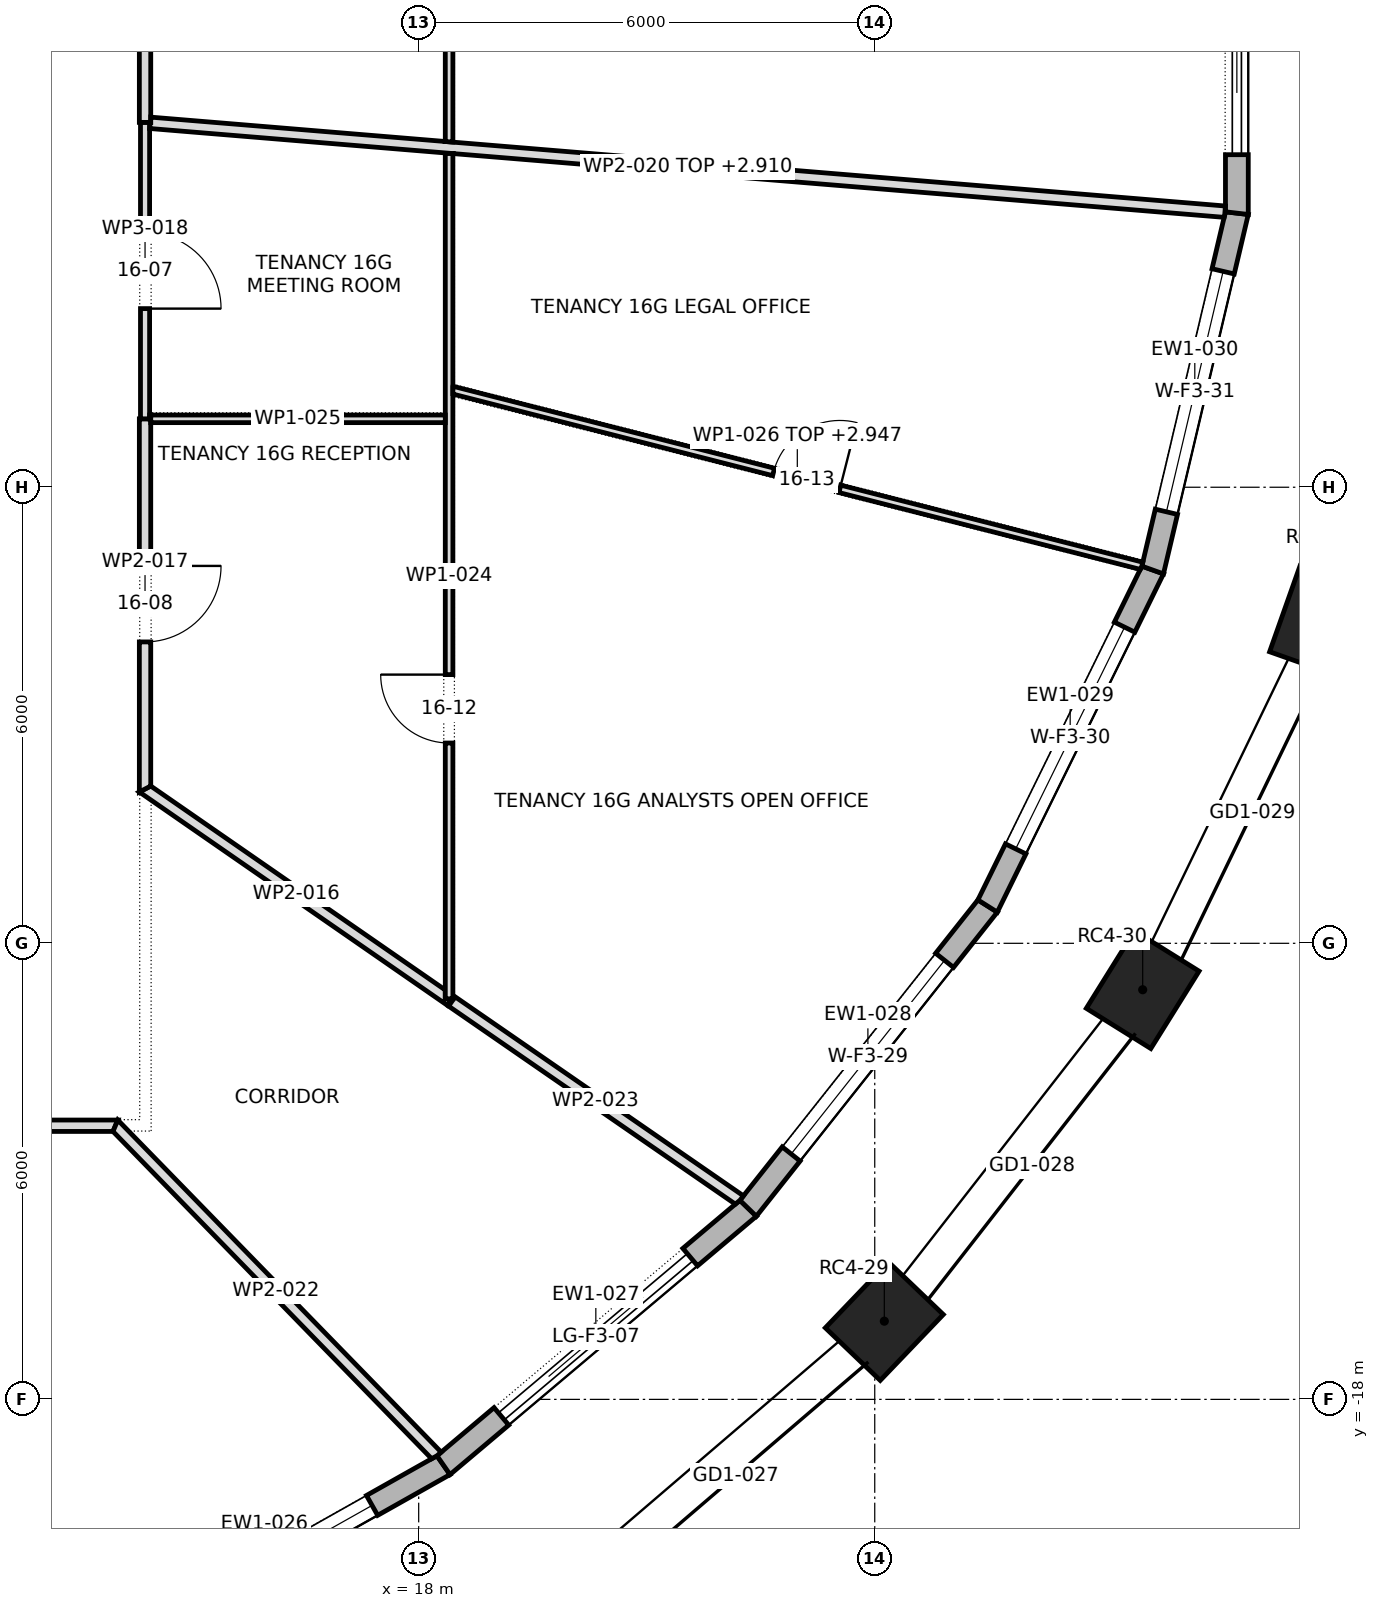
"""IFC4 building model, lengths in metres.
Left out: names, types, materials, properties, quantities, classifications, styles, units other than length and angle.
Written with IfcOpenShell. Run it as: python <this file> out.ifc"""

import sys

from ifc_helpers import new_model, si_unit, direction, frame, frame_2d, origin, origin_2d, place, context, subcontext, project, spatial, polyline, rectangle, outline, extrude, element, fill, save


model = new_model("IFC4")
c1 = context("Model", 3, precision=1e-05, world=origin(), true_north=direction((0.0, 1.0)))
c2 = subcontext(c1, "Body", "Model", "MODEL_VIEW")
j1 = project(units=[si_unit("LENGTHUNIT", "METRE"), si_unit("PLANEANGLEUNIT", "RADIAN")], contexts=[c1])
p1 = place(None, origin())
s1 = spatial("IfcSite", under=j1, at=p1, CompositionType="ELEMENT")
p2 = place(p1, origin())
s2 = spatial("IfcBuilding", under=s1, at=p2, CompositionType="ELEMENT")
p3 = place(p2, frame((0.0, 0.0, 234.9)))
s3 = spatial("IfcBuildingStorey", under=s2, at=p3, CompositionType="ELEMENT", Elevation=234.9)
for number, where, z_axis, x_axis in (
    (1, (24.126, -16.971, 0.0), (0.0, 0.0, 1.0), (0.692, 0.722, 0.0)),
    (2, (27.525, -12.611, 0.0), (0.0, 0.0, 1.0), (0.529, 0.849, 0.0)),
    (3, (29.867, -7.766, 0.0), (0.0, 0.0, 1.0), (0.334, 0.943, 0.0)),
):
    element("IfcColumn", number, at=place(p3, frame(where, z_axis=z_axis, x_axis=x_axis)), inside=s3, PredefinedType="COLUMN", context=c2, shape_type="SweptSolid", body=[
        extrude(rectangle(XDim=1.2, YDim=1.0, at=origin_2d()), origin(), (0.0, 0.0, 1.0), 4.0),
    ])
p4 = place(p3, frame((13.616, -21.52, 0.0), z_axis=(0.0, 0.0, 1.0), x_axis=(0.871225596594, 0.490882837181, 0.0)))
e4 = element("IfcWall", 4, at=p4, inside=s3, PredefinedType="STANDARD", context=c2, shape_type="SweptSolid", body=[
    extrude(outline(polyline([(-0.013, -0.15), (5.421, -0.15), (5.393, 0.15), (0.013, 0.15), (-0.013, -0.15)])), origin(), (0.0, 0.0, 1.0), 3.7),
])
p5 = place(p4, frame((1.078, 0.0, 0.6)))
e5 = element("IfcOpeningElement", 5, at=p5, cuts=e4, PredefinedType="OPENING", context=c2, shape_type="SweptSolid", body=[
    extrude(rectangle(XDim=3.25, YDim=2.65, at=frame_2d((1.625, 1.325))), frame((0.0, 0.162, 0.0), z_axis=(0.0, -1.0, 0.0), x_axis=(1.0, 0.0, 0.0)), (0.0, 0.0, 1.0), 0.324),
])
p6 = place(p3, frame((18.326, -18.865, 0.0), z_axis=(0.0, 0.0, 1.0), x_axis=(0.764475071601, 0.644653290459, 0.0)))
e6 = element("IfcWall", 6, at=p6, inside=s3, PredefinedType="STANDARD", context=c2, shape_type="SweptSolid", body=[
    extrude(outline(polyline([(-0.014, -0.15), (5.258, -0.15), (5.228, 0.15), (0.014, 0.15), (-0.014, -0.15)])), origin(), (0.0, 0.0, 1.0), 3.7),
])
p7 = place(p6, frame((0.996, 0.0, 0.0)))
e7 = element("IfcOpeningElement", 7, at=p7, cuts=e6, PredefinedType="OPENING", context=c2, shape_type="SweptSolid", body=[
    extrude(rectangle(XDim=3.25, YDim=3.25, at=frame_2d((1.625, 1.625))), frame((0.0, 0.162, 0.0), z_axis=(0.0, -1.0, 0.0), x_axis=(1.0, 0.0, 0.0)), (0.0, 0.0, 1.0), 0.324),
])
p8 = place(p3, frame((22.334, -15.486, 0.0), z_axis=(0.0, 0.0, 1.0), x_axis=(0.621084984443, 0.783743224596, 0.0)))
e8 = element("IfcWall", 8, at=p8, inside=s3, PredefinedType="STANDARD", context=c2, shape_type="SweptSolid", body=[
    extrude(outline(polyline([(-0.015, -0.15), (5.089, -0.15), (5.057, 0.15), (0.015, 0.15), (-0.015, -0.15)])), origin(), (0.0, 0.0, 1.0), 3.7),
])
p9 = place(p8, frame((0.912, 0.0, 0.6)))
e9 = element("IfcOpeningElement", 9, at=p9, cuts=e8, PredefinedType="OPENING", context=c2, shape_type="SweptSolid", body=[
    extrude(rectangle(XDim=3.25, YDim=2.65, at=frame_2d((1.625, 1.325))), frame((0.0, 0.162, 0.0), z_axis=(0.0, -1.0, 0.0), x_axis=(1.0, 0.0, 0.0)), (0.0, 0.0, 1.0), 0.324),
])
p10 = place(p3, frame((25.485, -11.51, 0.0), z_axis=(0.0, 0.0, 1.0), x_axis=(0.440857641837, 0.897577038272, 0.0)))
e10 = element("IfcWall", 10, at=p10, inside=s3, PredefinedType="STANDARD", context=c2, shape_type="SweptSolid", body=[
    extrude(outline(polyline([(-0.016, -0.15), (4.942, -0.15), (4.908, 0.15), (0.016, 0.15), (-0.016, -0.15)])), origin(), (0.0, 0.0, 1.0), 3.7),
])
p11 = place(p10, frame((0.838, 0.0, 0.6)))
e11 = element("IfcOpeningElement", 11, at=p11, cuts=e10, PredefinedType="OPENING", context=c2, shape_type="SweptSolid", body=[
    extrude(rectangle(XDim=3.25, YDim=2.65, at=frame_2d((1.625, 1.325))), frame((0.0, 0.162, 0.0), z_axis=(0.0, -1.0, 0.0), x_axis=(1.0, 0.0, 0.0)), (0.0, 0.0, 1.0), 0.324),
])
p12 = place(p3, frame((27.656, -7.089, 0.0), z_axis=(0.0, 0.0, 1.0), x_axis=(0.229617574796, 0.97328093033, 0.0)))
e12 = element("IfcWall", 12, at=p12, inside=s3, PredefinedType="STANDARD", context=c2, shape_type="SweptSolid", body=[
    extrude(outline(polyline([(-0.017, -0.15), (4.841, -0.15), (4.807, 0.15), (0.017, 0.15), (-0.017, -0.15)])), origin(), (0.0, 0.0, 1.0), 3.7),
])
p13 = place(p12, frame((0.787, 0.0, 0.6)))
e13 = element("IfcOpeningElement", 13, at=p13, cuts=e12, PredefinedType="OPENING", context=c2, shape_type="SweptSolid", body=[
    extrude(rectangle(XDim=3.25, YDim=2.65, at=frame_2d((1.625, 1.325))), frame((0.0, 0.162, 0.0), z_axis=(0.0, -1.0, 0.0), x_axis=(1.0, 0.0, 0.0)), (0.0, 0.0, 1.0), 0.324),
])
p14 = place(p3, frame((28.764, -2.394, 0.0), z_axis=(0.0, 0.0, 1.0), x_axis=(0.0, 1.0, 0.0)))
e14 = element("IfcWall", 14, at=p14, inside=s3, PredefinedType="STANDARD", context=c2, shape_type="SweptSolid", body=[
    extrude(outline(polyline([(-0.017, -0.15), (4.805, -0.15), (4.77, 0.15), (0.017, 0.15), (-0.017, -0.15)])), origin(), (0.0, 0.0, 1.0), 3.7),
])
p15 = place(p14, frame((0.769, 0.0, 0.0)))
e15 = element("IfcOpeningElement", 15, at=p15, cuts=e14, PredefinedType="OPENING", context=c2, shape_type="SweptSolid", body=[
    extrude(rectangle(XDim=3.25, YDim=3.25, at=frame_2d((1.625, 1.625))), frame((0.0, 0.162, 0.0), z_axis=(0.0, -1.0, 0.0), x_axis=(1.0, 0.0, 0.0)), (0.0, 0.0, 1.0), 0.324),
])
p16 = place(p3, frame((14.042, -14.4, 0.0), z_axis=(0.0, 0.0, 1.0), x_axis=(-1.0, 0.0, 0.0)))
e16 = element("IfcWall", 16, at=p16, inside=s3, PredefinedType="PARTITIONING", context=c2, shape_type="SweptSolid", body=[
    extrude(outline(polyline([(12.446, -0.075), (12.446, -0.075), (12.278, 0.075), (10.533, 0.075), (8.788, 0.075), (7.043, 0.075), (5.298, 0.075), (3.553, 0.075), (1.808, 0.075), (0.063, 0.075), (0.0, -0.075), (1.778, -0.075), (3.556, -0.075), (5.334, -0.075), (7.112, -0.075), (8.89, -0.075), (10.668, -0.075), (12.446, -0.075)])), origin(), (0.0, 0.0, 1.0), 3.7),
])
p17 = place(p16, frame((5.697, 0.0, 0.0)))
e17 = element("IfcOpeningElement", 17, at=p17, cuts=e16, PredefinedType="OPENING", context=c2, shape_type="SweptSolid", body=[
    extrude(rectangle(XDim=1.0, YDim=2.1, at=frame_2d((0.5, 1.05))), frame((0.0, 0.087, 0.0), z_axis=(0.0, -1.0, 0.0), x_axis=(1.0, 0.0, 0.0)), (0.0, 0.0, 1.0), 0.174),
])
p18 = place(p3, frame((14.368, -9.948, 0.0), z_axis=(0.0, 0.0, 1.0), x_axis=(0.822094305235, -0.569351344339, 0.0)))
e18 = element("IfcWall", 18, at=p18, inside=s3, PredefinedType="PARTITIONING", context=c2, shape_type="SweptSolid", body=[
    extrude(outline(polyline([(4.939, -0.075), (4.939, 0.036), (4.858, -0.02), (4.792, 0.075), (3.221, 0.075), (1.65, 0.075), (0.079, 0.075), (0.039, 0.0), (0.0, -0.075), (1.646, -0.075), (3.293, -0.075), (4.939, -0.075)])), origin(), (0.0, 0.0, 1.0), 3.7),
])
p19 = place(p3, frame((14.4, -5.1, 0.0), z_axis=(0.0, 0.0, 1.0), x_axis=(0.0, -1.0, 0.0)))
e19 = element("IfcWall", 19, at=p19, inside=s3, PredefinedType="PARTITIONING", context=c2, shape_type="SweptSolid", body=[
    extrude(outline(polyline([(4.909, -0.075), (4.909, -0.075), (4.831, 0.075), (3.22, 0.075), (1.61, 0.075), (0.0, 0.075), (0.0, -0.075), (1.636, -0.075), (3.273, -0.075), (4.909, -0.075)])), origin(), (0.0, 0.0, 1.0), 3.7),
])
p20 = place(p19, frame((1.935, 0.0, 0.0)))
e20 = element("IfcOpeningElement", 20, at=p20, cuts=e19, PredefinedType="OPENING", context=c2, shape_type="SweptSolid", body=[
    extrude(rectangle(XDim=1.0, YDim=2.1, at=frame_2d((0.5, 1.05))), frame((0.0, 0.087, 0.0), z_axis=(0.0, -1.0, 0.0), x_axis=(1.0, 0.0, 0.0)), (0.0, 0.0, 1.0), 0.174),
])
p21 = place(p3, frame((14.4, -1.2, 0.0), z_axis=(0.0, 0.0, 1.0), x_axis=(0.0, -1.0, 0.0)))
e21 = element("IfcWall", 21, at=p21, inside=s3, PredefinedType="PARTITIONING", context=c2, shape_type="SweptSolid", body=[
    extrude(rectangle(XDim=3.9, YDim=0.12, at=frame_2d((1.95, 0.0))), origin(), (0.0, 0.0, 1.0), 3.7),
])
p22 = place(p21, frame((1.45, 0.0, 0.0)))
e22 = element("IfcOpeningElement", 22, at=p22, cuts=e21, PredefinedType="OPENING", context=c2, shape_type="SweptSolid", body=[
    extrude(rectangle(XDim=1.0, YDim=2.1, at=frame_2d((0.5, 1.05))), frame((0.0, 0.072, 0.0), z_axis=(0.0, -1.0, 0.0), x_axis=(1.0, 0.0, 0.0)), (0.0, 0.0, 1.0), 0.144),
])
p23 = place(p3, frame((14.4, -1.2, 0.0), z_axis=(0.0, 0.0, 1.0), x_axis=(0.0, 1.0, 0.0)))
e23 = element("IfcWall", 23, at=p23, inside=s3, PredefinedType="PARTITIONING", context=c2, shape_type="SweptSolid", body=[
    extrude(outline(polyline([(0.0, -0.075), (1.855, -0.075), (3.71, -0.075), (5.565, -0.075), (7.42, -0.075), (9.276, -0.075), (11.131, -0.075), (11.209, 0.075), (11.209, 0.075), (9.341, 0.075), (7.473, 0.075), (5.604, 0.075), (3.736, 0.075), (1.868, 0.075), (0.0, 0.075), (0.0, -0.075)])), origin(), (0.0, 0.0, 1.0), 3.7),
])
p24 = place(p23, frame((3.07, 0.0, 0.0)))
e24 = element("IfcOpeningElement", 24, at=p24, cuts=e23, PredefinedType="OPENING", context=c2, shape_type="SweptSolid", body=[
    extrude(rectangle(XDim=1.0, YDim=2.1, at=frame_2d((0.5, 1.05))), frame((0.0, 0.087, 0.0), z_axis=(0.0, -1.0, 0.0), x_axis=(1.0, 0.0, 0.0)), (0.0, 0.0, 1.0), 0.174),
])
p25 = place(p3, frame((14.466, -1.206, 0.0), z_axis=(0.0, 0.0, 1.0), x_axis=(0.996598124583, -0.082414671491, 0.0)))
e25 = element("IfcWall", 25, at=p25, inside=s3, PredefinedType="PARTITIONING", context=c2, shape_type="SweptSolid", body=[
    extrude(outline(polyline([(0.0, -0.075), (1.334, -0.075), (2.667, -0.075), (4.001, -0.075), (4.003, -0.075), (4.003, -0.075), (5.7, -0.075), (7.397, -0.075), (9.094, -0.075), (10.791, -0.075), (12.488, -0.075), (14.185, -0.075), (14.19, -0.044), (14.19, 0.075), (12.475, 0.075), (10.761, 0.075), (9.046, 0.075), (7.332, 0.075), (5.617, 0.075), (3.903, 0.075), (3.891, 0.074), (3.891, 0.075), (1.947, 0.075), (0.002, 0.075), (0.008, 0.006), (0.0, 0.006), (0.0, -0.075)])), origin(), (0.0, 0.0, 1.0), 2.91),
])
p26 = place(p3, frame((18.242, -18.747, 0.0), z_axis=(0.0, 0.0, 1.0), x_axis=(-0.697616683155, 0.716471188105, 0.0)))
e26 = element("IfcWall", 26, at=p26, inside=s3, PredefinedType="PARTITIONING", context=c2, shape_type="SweptSolid", body=[
    extrude(outline(polyline([(0.0, -0.075), (1.525, -0.075), (3.049, -0.075), (4.574, -0.075), (6.099, -0.075), (6.067, 0.0), (6.035, 0.075), (4.533, 0.075), (3.031, 0.075), (1.528, 0.075), (0.025, 0.075), (0.005, -0.002), (0.0, -0.072), (0.0, -0.075)])), origin(), (0.0, 0.0, 1.0), 3.7),
])
p27 = place(p3, frame((18.428, -12.76, 0.0), z_axis=(0.0, 0.0, 1.0), x_axis=(0.822939262801, -0.568129360041, 0.0)))
e27 = element("IfcWall", 27, at=p27, inside=s3, PredefinedType="PARTITIONING", context=c2, shape_type="SweptSolid", body=[
    extrude(outline(polyline([(0.0, -0.075), (1.531, -0.075), (3.063, -0.075), (4.594, -0.075), (4.615, 0.0), (4.619, 0.068), (4.619, 0.075), (3.079, 0.075), (1.54, 0.075), (0.0, 0.075), (0.0, 0.038), (0.001, 0.037), (0.0, 0.036), (0.0, -0.075)])), origin(), (0.0, 0.0, 1.0), 3.7),
])
p28 = place(p3, frame((18.4, -12.73, 0.0), z_axis=(0.0, 0.0, 1.0), x_axis=(0.0, 1.0, 0.0)))
e28 = element("IfcWall", 28, at=p28, inside=s3, PredefinedType="PARTITIONING", context=c2, shape_type="SweptSolid", body=[
    extrude(rectangle(XDim=11.12, YDim=0.1, at=frame_2d((5.56, 0.0))), origin(), (0.0, 0.0, 1.0), 3.7),
])
p29 = place(p28, frame((3.365, 0.0, 0.0)))
e29 = element("IfcOpeningElement", 29, at=p29, cuts=e28, PredefinedType="OPENING", context=c2, shape_type="SweptSolid", body=[
    extrude(rectangle(XDim=0.9, YDim=2.1, at=frame_2d((0.45, 1.05))), frame((0.0, 0.062, 0.0), z_axis=(0.0, -1.0, 0.0), x_axis=(1.0, 0.0, 0.0)), (0.0, 0.0, 1.0), 0.124),
])
p30 = place(p3, frame((18.35, -5.1, 0.0), z_axis=(0.0, 0.0, 1.0), x_axis=(-1.0, 0.0, 0.0)))
e30 = element("IfcWall", 30, at=p30, inside=s3, PredefinedType="PARTITIONING", context=c2, shape_type="SweptSolid", body=[
    extrude(outline(polyline([(3.89, -0.05), (3.89, 0.0), (3.875, 0.0), (3.875, 0.05), (1.938, 0.05), (0.0, 0.05), (0.0, -0.05), (1.945, -0.05), (3.89, -0.05)])), origin(), (0.0, 0.0, 1.0), 3.7),
])
p31 = place(p3, frame((18.438, -4.719, 0.0), z_axis=(0.0, 0.0, 1.0), x_axis=(0.968975503795, -0.247156778269, 0.0)))
e31 = element("IfcWall", 31, at=p31, inside=s3, PredefinedType="PARTITIONING", context=c2, shape_type="SweptSolid", body=[
    extrude(outline(polyline([(0.025, -0.05), (1.892, -0.05), (3.759, -0.05), (5.625, -0.05), (7.492, -0.05), (9.358, -0.05), (9.367, -0.008), (9.367, 0.05), (7.494, 0.05), (5.62, 0.05), (3.747, 0.05), (1.874, 0.05), (0.0, 0.05), (0.0, 0.05), (0.025, -0.05)])), origin(), (0.0, 0.0, 1.0), 2.947),
])
p32 = place(p31, frame((4.367, 0.0, 0.0)))
e32 = element("IfcOpeningElement", 32, at=p32, cuts=e31, PredefinedType="OPENING", context=c2, shape_type="SweptSolid", body=[
    extrude(rectangle(XDim=0.9, YDim=2.1, at=frame_2d((0.45, 1.05))), frame((0.0, 0.062, 0.0), z_axis=(0.0, -1.0, 0.0), x_axis=(1.0, 0.0, 0.0)), (0.0, 0.0, 1.0), 0.124),
])
p33 = place(p3, frame((18.4, -1.459, 0.0), z_axis=(0.0, 0.0, 1.0), x_axis=(0.0, 1.0, 0.0)))
e33 = element("IfcWall", 33, at=p33, inside=s3, PredefinedType="PARTITIONING", context=c2, shape_type="SweptSolid", body=[
    extrude(outline(polyline([(0.0, -0.05), (1.557, -0.05), (3.113, -0.05), (4.67, -0.05), (6.227, -0.05), (6.233, -0.048), (6.234, -0.05), (8.027, -0.05), (9.821, -0.05), (9.826, -0.048), (9.827, -0.05), (11.268, -0.05), (12.709, -0.05), (14.151, -0.05), (14.151, -0.05), (14.145, -0.04), (14.151, -0.036), (14.151, -0.034), (14.138, -0.043), (14.073, 0.05), (12.417, 0.05), (10.761, 0.05), (9.105, 0.05), (7.449, 0.05), (7.449, 0.05), (7.349, 0.05), (7.349, 0.05), (5.514, 0.05), (3.679, 0.05), (1.844, 0.05), (0.008, 0.05), (0.0, -0.048), (0.0, -0.05)])), origin(), (0.0, 0.0, 1.0), 3.7),
])
p34 = place(p33, frame((2.6, 0.0, 0.0)))
e34 = element("IfcOpeningElement", 34, at=p34, cuts=e33, PredefinedType="OPENING", context=c2, shape_type="SweptSolid", body=[
    extrude(rectangle(XDim=0.9, YDim=2.1, at=frame_2d((0.45, 1.05))), frame((0.0, 0.062, 0.0), z_axis=(0.0, -1.0, 0.0), x_axis=(1.0, 0.0, 0.0)), (0.0, 0.0, 1.0), 0.124),
])
p35 = place(p5, origin())
e35 = element("IfcWindow", 35, at=p35, inside=s3, PartitioningType="TRIPLE_PANEL_VERTICAL", PredefinedType="WINDOW", context=c2, shape_type="SweptSolid", body=[
    extrude(rectangle(XDim=3.25, YDim=2.65, at=frame_2d((1.625, 1.325))), frame((0.0, 0.03, 0.0), z_axis=(0.0, -1.0, 0.0), x_axis=(1.0, 0.0, 0.0)), (0.0, 0.0, 1.0), 0.06),
])
fill(e5, e35)
p36 = place(p7, origin())
e36 = element("IfcDoor", 36, at=p36, inside=s3, OperationType="DOUBLE_DOOR_SLIDING", PredefinedType="DOOR", context=c2, shape_type="SweptSolid", body=[
    extrude(rectangle(XDim=3.25, YDim=3.25, at=frame_2d((1.625, 1.625))), frame((0.0, 0.025, 0.0), z_axis=(0.0, -1.0, 0.0), x_axis=(1.0, 0.0, 0.0)), (0.0, 0.0, 1.0), 0.05),
])
fill(e7, e36)
p37 = place(p9, origin())
e37 = element("IfcWindow", 37, at=p37, inside=s3, PartitioningType="TRIPLE_PANEL_VERTICAL", PredefinedType="WINDOW", context=c2, shape_type="SweptSolid", body=[
    extrude(rectangle(XDim=3.25, YDim=2.65, at=frame_2d((1.625, 1.325))), frame((0.0, 0.03, 0.0), z_axis=(0.0, -1.0, 0.0), x_axis=(1.0, 0.0, 0.0)), (0.0, 0.0, 1.0), 0.06),
])
fill(e9, e37)
p38 = place(p11, origin())
e38 = element("IfcWindow", 38, at=p38, inside=s3, PartitioningType="TRIPLE_PANEL_VERTICAL", PredefinedType="WINDOW", context=c2, shape_type="SweptSolid", body=[
    extrude(rectangle(XDim=3.25, YDim=2.65, at=frame_2d((1.625, 1.325))), frame((0.0, 0.03, 0.0), z_axis=(0.0, -1.0, 0.0), x_axis=(1.0, 0.0, 0.0)), (0.0, 0.0, 1.0), 0.06),
])
fill(e11, e38)
p39 = place(p13, origin())
e39 = element("IfcWindow", 39, at=p39, inside=s3, PartitioningType="TRIPLE_PANEL_VERTICAL", PredefinedType="WINDOW", context=c2, shape_type="SweptSolid", body=[
    extrude(rectangle(XDim=3.25, YDim=2.65, at=frame_2d((1.625, 1.325))), frame((0.0, 0.03, 0.0), z_axis=(0.0, -1.0, 0.0), x_axis=(1.0, 0.0, 0.0)), (0.0, 0.0, 1.0), 0.06),
])
fill(e13, e39)
p40 = place(p15, origin())
e40 = element("IfcDoor", 40, at=p40, inside=s3, OperationType="DOUBLE_DOOR_SLIDING", PredefinedType="DOOR", context=c2, shape_type="SweptSolid", body=[
    extrude(rectangle(XDim=3.25, YDim=3.25, at=frame_2d((1.625, 1.625))), frame((0.0, 0.025, 0.0), z_axis=(0.0, -1.0, 0.0), x_axis=(1.0, 0.0, 0.0)), (0.0, 0.0, 1.0), 0.05),
])
fill(e15, e40)
p41 = place(p22, origin())
e41 = element("IfcDoor", 41, at=p41, inside=s3, OperationType="SINGLE_SWING_LEFT", PredefinedType="DOOR", context=c2, shape_type="SweptSolid", body=[
    extrude(rectangle(XDim=1.0, YDim=2.1, at=frame_2d((0.5, 1.05))), frame((0.0, 0.025, 0.0), z_axis=(0.0, -1.0, 0.0), x_axis=(1.0, 0.0, 0.0)), (0.0, 0.0, 1.0), 0.05),
])
fill(e22, e41)
p42 = place(p20, origin())
e42 = element("IfcDoor", 42, at=p42, inside=s3, OperationType="SINGLE_SWING_RIGHT", PredefinedType="DOOR", context=c2, shape_type="SweptSolid", body=[
    extrude(rectangle(XDim=1.0, YDim=2.1, at=frame_2d((0.5, 1.05))), frame((0.0, 0.025, 0.0), z_axis=(0.0, -1.0, 0.0), x_axis=(1.0, 0.0, 0.0)), (0.0, 0.0, 1.0), 0.05),
])
fill(e20, e42)
p43 = place(p29, origin())
e43 = element("IfcDoor", 43, at=p43, inside=s3, OperationType="SINGLE_SWING_LEFT", PredefinedType="DOOR", context=c2, shape_type="SweptSolid", body=[
    extrude(rectangle(XDim=0.9, YDim=2.1, at=frame_2d((0.45, 1.05))), frame((0.0, 0.025, 0.0), z_axis=(0.0, -1.0, 0.0), x_axis=(1.0, 0.0, 0.0)), (0.0, 0.0, 1.0), 0.05),
])
fill(e29, e43)
p44 = place(p32, origin())
e44 = element("IfcDoor", 44, at=p44, inside=s3, OperationType="SINGLE_SWING_LEFT", PredefinedType="DOOR", context=c2, shape_type="SweptSolid", body=[
    extrude(rectangle(XDim=0.9, YDim=2.1, at=frame_2d((0.45, 1.05))), frame((0.0, 0.025, 0.0), z_axis=(0.0, -1.0, 0.0), x_axis=(1.0, 0.0, 0.0)), (0.0, 0.0, 1.0), 0.05),
])
fill(e32, e44)
save(model, sys.argv[1])
